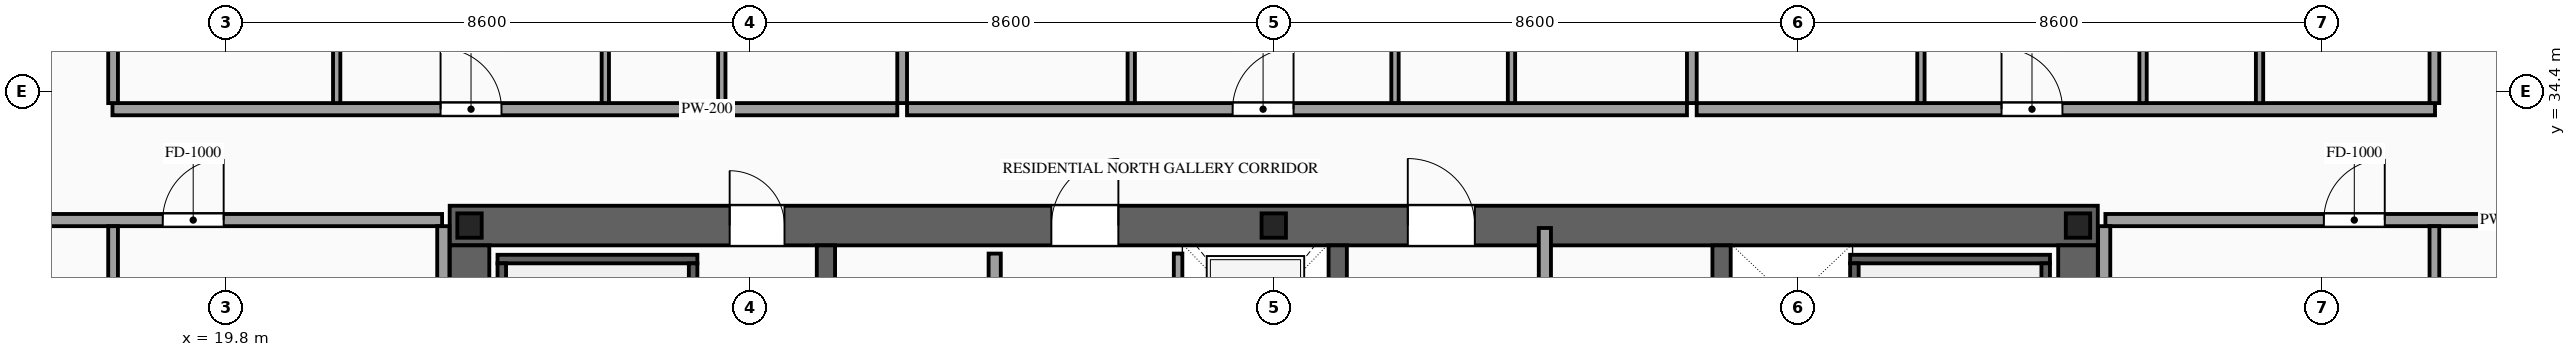
"""IFC4 building model, lengths in metres.
Left out: names, types, materials, properties, quantities, classifications, styles, units other than length and angle.
Written with IfcOpenShell. Run it as: python <this file> out.ifc"""

import sys

from ifc_helpers import new_model, si_unit, direction, frame, frame_2d, origin, origin_2d, place, context, subcontext, project, spatial, rectangle, i_section, extrude, source, transform, mapped, element, fill, save


model = new_model("IFC4")
c1 = context("Model", 3, precision=1e-05, world=origin(), true_north=direction((0.0, 1.0)))
c2 = subcontext(c1, "Body", "Model", "MODEL_VIEW")
j1 = project(units=[si_unit("LENGTHUNIT", "METRE"), si_unit("PLANEANGLEUNIT", "RADIAN")], contexts=[c1])
p1 = place(None, origin())
s1 = spatial("IfcSite", under=j1, at=p1, CompositionType="ELEMENT")
p2 = place(p1, origin())
s2 = spatial("IfcBuilding", under=s1, at=p2, CompositionType="ELEMENT")
p3 = place(p2, frame((0.0, 0.0, 205.5)))
s3 = spatial("IfcBuildingStorey", under=s2, at=p3, CompositionType="ELEMENT", Elevation=205.5)
p4 = place(p3, frame((23.475, 32.2, 0.0), z_axis=(0.0, 0.0, 1.0), x_axis=(1.0, 0.0, 0.0)))
e1 = element("IfcWall", 1, at=p4, inside=s3, PredefinedType="SHEAR", context=c2, shape_type="SweptSolid", body=[
    extrude(rectangle(XDim=27.05, YDim=0.65, at=frame_2d((13.525, 0.0))), origin(), (0.0, 0.0, 1.0), 3.5),
])
p5 = place(p4, frame((4.595, 0.0, 0.0)))
e2 = element("IfcOpeningElement", 2, at=p5, cuts=e1, PredefinedType="OPENING", context=c2, shape_type="SweptSolid", body=[
    extrude(rectangle(XDim=0.9, YDim=2.15, at=frame_2d((0.45, 1.075))), frame((0.0, 0.34, 0.0), z_axis=(0.0, -1.0, 0.0), x_axis=(1.0, 0.0, 0.0)), (0.0, 0.0, 1.0), 0.68),
])
p6 = place(p4, frame((9.875, 0.0, 0.0)))
e3 = element("IfcOpeningElement", 3, at=p6, cuts=e1, PredefinedType="OPENING", context=c2, shape_type="SweptSolid", body=[
    extrude(rectangle(XDim=1.1, YDim=2.2, at=frame_2d((0.55, 1.1))), frame((0.0, 0.34, 0.0), z_axis=(0.0, -1.0, 0.0), x_axis=(1.0, 0.0, 0.0)), (0.0, 0.0, 1.0), 0.68),
])
p7 = place(p4, frame((15.725, 0.0, 0.0)))
e4 = element("IfcOpeningElement", 4, at=p7, cuts=e1, PredefinedType="OPENING", context=c2, shape_type="SweptSolid", body=[
    extrude(rectangle(XDim=1.1, YDim=2.2, at=frame_2d((0.55, 1.1))), frame((0.0, 0.34, 0.0), z_axis=(0.0, -1.0, 0.0), x_axis=(1.0, 0.0, 0.0)), (0.0, 0.0, 1.0), 0.68),
])
m1 = source(origin(), c2, "Body", "SweptSolid", [
    extrude(rectangle(XDim=12.15, YDim=0.65, at=frame_2d((6.075, 0.0))), origin(), (0.0, 0.0, 1.0), 3.5),
])
for number, where, z_axis, x_axis in (
    (5, (23.8, 19.725, 0.0), (0.0, 0.0, 1.0), (0.0, 1.0, 0.0)),
    (6, (50.2, 19.725, 0.0), (0.0, 0.0, 1.0), (0.0, 1.0, 0.0)),
):
    element("IfcWall", number, at=place(p3, frame(where, z_axis=z_axis, x_axis=x_axis)), inside=s3, PredefinedType="SHEAR", context=c2, shape_type="MappedRepresentation", body=[
        mapped(m1, transform((0.0, 0.0, 0.0), scale=1.0)),
    ])
m2 = source(origin(), c2, "Body", "SweptSolid", [
    extrude(rectangle(XDim=12.15, YDim=0.3, at=frame_2d((6.075, 0.0))), origin(), (0.0, 0.0, 1.0), 3.5),
])
for number, where, z_axis, x_axis in (
    (7, (29.65, 19.725, 0.0), (0.0, 0.0, 1.0), (0.0, 1.0, 0.0)),
    (8, (38.05, 19.725, 0.0), (0.0, 0.0, 1.0), (0.0, 1.0, 0.0)),
    (9, (44.35, 19.725, 0.0), (0.0, 0.0, 1.0), (0.0, 1.0, 0.0)),
):
    element("IfcWall", number, at=place(p3, frame(where, z_axis=z_axis, x_axis=x_axis)), inside=s3, PredefinedType="SOLIDWALL", context=c2, shape_type="MappedRepresentation", body=[
        mapped(m2, transform((0.0, 0.0, 0.0), scale=1.0)),
    ])
m3 = source(origin(), c2, "Body", "SweptSolid", [
    extrude(i_section(OverallWidth=0.4, OverallDepth=0.4, WebThickness=0.013, FlangeThickness=0.021, at=origin_2d()), origin(), (0.0, 0.0, 1.0), 3.5),
])
for number, where, z_axis, x_axis in (
    (10, (23.8, 32.2, 0.0), (0.0, 0.0, 1.0), (1.0, 0.0, 0.0)),
    (11, (37.0, 32.2, 0.0), (0.0, 0.0, 1.0), (1.0, 0.0, 0.0)),
    (12, (50.2, 32.2, 0.0), (0.0, 0.0, 1.0), (1.0, 0.0, 0.0)),
):
    element("IfcColumn", number, at=place(p3, frame(where, z_axis=z_axis, x_axis=x_axis)), inside=s3, PredefinedType="COLUMN", context=c2, shape_type="MappedRepresentation", body=[
        mapped(m3, transform((0.0, 0.0, 0.0), scale=1.0)),
    ])
p8 = place(p3, frame((35.43, 29.4, 0.0), z_axis=(0.0, 0.0, 1.0), x_axis=(0.0, 1.0, 0.0)))
e13 = element("IfcWall", 13, at=p8, inside=s3, PredefinedType="SOLIDWALL", context=c2, shape_type="SweptSolid", body=[
    extrude(rectangle(XDim=2.34, YDim=0.14, at=frame_2d((1.17, 0.0))), origin(), (0.0, 0.0, 1.0), 3.28),
])
p9 = place(p8, frame((0.62, 0.0, 0.0)))
e14 = element("IfcOpeningElement", 14, at=p9, cuts=e13, PredefinedType="OPENING", context=c2, shape_type="SweptSolid", body=[
    extrude(rectangle(XDim=1.1, YDim=2.2, at=frame_2d((0.55, 1.1))), frame((0.0, 0.085, 0.0), z_axis=(0.0, -1.0, 0.0), x_axis=(1.0, 0.0, 0.0)), (0.0, 0.0, 1.0), 0.17),
])
m4 = source(origin(), c2, "Body", "SweptSolid", [
    extrude(rectangle(XDim=3.28, YDim=0.14, at=frame_2d((1.64, 0.0))), origin(), (0.0, 0.0, 1.0), 3.28),
])
p10 = place(p3, frame((24.26, 31.65, 0.0), z_axis=(0.0, 0.0, 1.0), x_axis=(1.0, 0.0, 0.0)))
e15 = element("IfcWall", 15, at=p10, inside=s3, PredefinedType="SOLIDWALL", context=c2, shape_type="MappedRepresentation", body=[
    mapped(m4, transform((0.0, 0.0, 0.0), scale=1.0)),
])
m5 = source(origin(), c2, "Body", "SweptSolid", [
    extrude(rectangle(XDim=8.94, YDim=0.14, at=frame_2d((4.47, 0.0))), origin(), (0.0, 0.0, 1.0), 3.28),
])
for number, where, z_axis, x_axis in (
    (16, (24.33, 22.64, 0.0), (0.0, 0.0, 1.0), (0.0, 1.0, 0.0)),
    (17, (27.47, 22.64, 0.0), (0.0, 0.0, 1.0), (0.0, 1.0, 0.0)),
):
    element("IfcWall", number, at=place(p3, frame(where, z_axis=z_axis, x_axis=x_axis)), inside=s3, PredefinedType="SOLIDWALL", context=c2, shape_type="MappedRepresentation", body=[
        mapped(m5, transform((0.0, 0.0, 0.0), scale=1.0)),
    ])
p11 = place(p3, frame((46.46, 31.65, 0.0), z_axis=(0.0, 0.0, 1.0), x_axis=(1.0, 0.0, 0.0)))
e18 = element("IfcWall", 18, at=p11, inside=s3, PredefinedType="SOLIDWALL", context=c2, shape_type="MappedRepresentation", body=[
    mapped(m4, transform((0.0, 0.0, 0.0), scale=1.0)),
])
for number, where, z_axis, x_axis in (
    (19, (46.53, 22.64, 0.0), (0.0, 0.0, 1.0), (0.0, 1.0, 0.0)),
    (20, (49.67, 22.64, 0.0), (0.0, 0.0, 1.0), (0.0, 1.0, 0.0)),
):
    element("IfcWall", number, at=place(p3, frame(where, z_axis=z_axis, x_axis=x_axis)), inside=s3, PredefinedType="SOLIDWALL", context=c2, shape_type="MappedRepresentation", body=[
        mapped(m5, transform((0.0, 0.0, 0.0), scale=1.0)),
    ])
p12 = place(p3, frame((32.42, 19.86, 0.0), z_axis=(0.0, 0.0, 1.0), x_axis=(0.0, 1.0, 0.0)))
e21 = element("IfcWall", 21, at=p12, inside=s3, PredefinedType="PARTITIONING", context=c2, shape_type="SweptSolid", body=[
    extrude(rectangle(XDim=11.88, YDim=0.2, at=frame_2d((5.94, 0.0))), origin(), (0.0, 0.0, 1.0), 3.28),
])
p13 = place(p12, frame((5.49, 0.0, 0.0)))
e22 = element("IfcOpeningElement", 22, at=p13, cuts=e21, PredefinedType="OPENING", context=c2, shape_type="SweptSolid", body=[
    extrude(rectangle(XDim=0.9, YDim=2.15, at=frame_2d((0.45, 1.075))), frame((0.0, 0.115, 0.0), z_axis=(0.0, -1.0, 0.0), x_axis=(1.0, 0.0, 0.0)), (0.0, 0.0, 1.0), 0.23),
])
m6 = source(origin(), c2, "Body", "SweptSolid", [
    extrude(rectangle(XDim=12.72, YDim=0.2, at=frame_2d((6.36, 0.0))), origin(), (0.0, 0.0, 1.0), 3.28),
])
p14 = place(p3, frame((41.45, 19.44, 0.0), z_axis=(0.0, 0.0, 1.0), x_axis=(0.0, 1.0, 0.0)))
e23 = element("IfcWall", 23, at=p14, inside=s3, PredefinedType="PARTITIONING", context=c2, shape_type="MappedRepresentation", body=[
    mapped(m6, transform((0.0, 0.0, 0.0), scale=1.0)),
])
p15 = place(p3, frame((17.94, 34.11, 0.0), z_axis=(0.0, 0.0, 1.0), x_axis=(1.0, 0.0, 0.0)))
e24 = element("IfcWall", 24, at=p15, inside=s3, PredefinedType="PARTITIONING", context=c2, shape_type="SweptSolid", body=[
    extrude(rectangle(XDim=12.881, YDim=0.2, at=frame_2d((6.44, 0.0))), origin(), (0.0, 0.0, 1.0), 3.28),
])
p16 = place(p15, frame((5.385, 0.0, 0.0)))
e25 = element("IfcOpeningElement", 25, at=p16, cuts=e24, PredefinedType="OPENING", context=c2, shape_type="SweptSolid", body=[
    extrude(rectangle(XDim=1.0, YDim=2.2, at=frame_2d((0.5, 1.1))), frame((0.0, 0.115, 0.0), z_axis=(0.0, -1.0, 0.0), x_axis=(1.0, 0.0, 0.0)), (0.0, 0.0, 1.0), 0.23),
])
m7 = source(origin(), c2, "Body", "SweptSolid", [
    extrude(rectangle(XDim=13.54, YDim=0.16, at=frame_2d((6.77, 0.0))), origin(), (0.0, 0.0, 1.0), 3.28),
])
p17 = place(p3, frame((30.901, 34.21, 0.0), z_axis=(0.0, 0.0, 1.0), x_axis=(0.0, 1.0, 0.0)))
e26 = element("IfcWall", 26, at=p17, inside=s3, PredefinedType="PARTITIONING", context=c2, shape_type="MappedRepresentation", body=[
    mapped(m7, transform((0.0, 0.0, 0.0), scale=1.0)),
])
m8 = source(origin(), c2, "Body", "SweptSolid", [
    extrude(rectangle(XDim=5.61, YDim=0.12, at=frame_2d((2.805, 0.0))), origin(), (0.0, 0.0, 1.0), 3.28),
])
p18 = place(p3, frame((21.62, 34.21, 0.0), z_axis=(0.0, 0.0, 1.0), x_axis=(0.0, 1.0, 0.0)))
e27 = element("IfcWall", 27, at=p18, inside=s3, PredefinedType="PARTITIONING", context=c2, shape_type="MappedRepresentation", body=[
    mapped(m8, transform((0.0, 0.0, 0.0), scale=1.0)),
])
p19 = place(p3, frame((27.941, 34.21, 0.0), z_axis=(0.0, 0.0, 1.0), x_axis=(0.0, 1.0, 0.0)))
e28 = element("IfcWall", 28, at=p19, inside=s3, PredefinedType="PARTITIONING", context=c2, shape_type="SweptSolid", body=[
    extrude(rectangle(XDim=5.61, YDim=0.12, at=frame_2d((2.805, 0.0))), origin(), (0.0, 0.0, 1.0), 3.28),
])
p20 = place(p19, frame((2.38, 0.0, 0.0)))
e29 = element("IfcOpeningElement", 29, at=p20, cuts=e28, PredefinedType="OPENING", context=c2, shape_type="SweptSolid", body=[
    extrude(rectangle(XDim=0.85, YDim=2.1, at=frame_2d((0.425, 1.05))), frame((0.0, 0.075, 0.0), z_axis=(0.0, -1.0, 0.0), x_axis=(1.0, 0.0, 0.0)), (0.0, 0.0, 1.0), 0.15),
])
p21 = place(p3, frame((26.029, 34.21, 0.0), z_axis=(0.0, 0.0, 1.0), x_axis=(0.0, 1.0, 0.0)))
e30 = element("IfcWall", 30, at=p21, inside=s3, PredefinedType="PARTITIONING", context=c2, shape_type="SweptSolid", body=[
    extrude(rectangle(XDim=5.61, YDim=0.12, at=frame_2d((2.805, 0.0))), origin(), (0.0, 0.0, 1.0), 3.28),
])
p22 = place(p21, frame((2.38, 0.0, 0.0)))
e31 = element("IfcOpeningElement", 31, at=p22, cuts=e30, PredefinedType="OPENING", context=c2, shape_type="SweptSolid", body=[
    extrude(rectangle(XDim=0.85, YDim=2.1, at=frame_2d((0.425, 1.05))), frame((0.0, 0.075, 0.0), z_axis=(0.0, -1.0, 0.0), x_axis=(1.0, 0.0, 0.0)), (0.0, 0.0, 1.0), 0.15),
])
p23 = place(p3, frame((30.981, 34.11, 0.0), z_axis=(0.0, 0.0, 1.0), x_axis=(1.0, 0.0, 0.0)))
e32 = element("IfcWall", 32, at=p23, inside=s3, PredefinedType="PARTITIONING", context=c2, shape_type="SweptSolid", body=[
    extrude(rectangle(XDim=12.801, YDim=0.2, at=frame_2d((6.4, 0.0))), origin(), (0.0, 0.0, 1.0), 3.28),
])
p24 = place(p23, frame((5.344, 0.0, 0.0)))
e33 = element("IfcOpeningElement", 33, at=p24, cuts=e32, PredefinedType="OPENING", context=c2, shape_type="SweptSolid", body=[
    extrude(rectangle(XDim=1.0, YDim=2.2, at=frame_2d((0.5, 1.1))), frame((0.0, 0.115, 0.0), z_axis=(0.0, -1.0, 0.0), x_axis=(1.0, 0.0, 0.0)), (0.0, 0.0, 1.0), 0.23),
])
p25 = place(p3, frame((43.862, 34.21, 0.0), z_axis=(0.0, 0.0, 1.0), x_axis=(0.0, 1.0, 0.0)))
e34 = element("IfcWall", 34, at=p25, inside=s3, PredefinedType="PARTITIONING", context=c2, shape_type="MappedRepresentation", body=[
    mapped(m7, transform((0.0, 0.0, 0.0), scale=1.0)),
])
p26 = place(p3, frame((34.661, 34.21, 0.0), z_axis=(0.0, 0.0, 1.0), x_axis=(0.0, 1.0, 0.0)))
e35 = element("IfcWall", 35, at=p26, inside=s3, PredefinedType="PARTITIONING", context=c2, shape_type="MappedRepresentation", body=[
    mapped(m8, transform((0.0, 0.0, 0.0), scale=1.0)),
])
p27 = place(p3, frame((40.902, 34.21, 0.0), z_axis=(0.0, 0.0, 1.0), x_axis=(0.0, 1.0, 0.0)))
e36 = element("IfcWall", 36, at=p27, inside=s3, PredefinedType="PARTITIONING", context=c2, shape_type="SweptSolid", body=[
    extrude(rectangle(XDim=5.61, YDim=0.12, at=frame_2d((2.805, 0.0))), origin(), (0.0, 0.0, 1.0), 3.28),
])
p28 = place(p27, frame((2.38, 0.0, 0.0)))
e37 = element("IfcOpeningElement", 37, at=p28, cuts=e36, PredefinedType="OPENING", context=c2, shape_type="SweptSolid", body=[
    extrude(rectangle(XDim=0.85, YDim=2.1, at=frame_2d((0.425, 1.05))), frame((0.0, 0.075, 0.0), z_axis=(0.0, -1.0, 0.0), x_axis=(1.0, 0.0, 0.0)), (0.0, 0.0, 1.0), 0.15),
])
p29 = place(p3, frame((38.99, 34.21, 0.0), z_axis=(0.0, 0.0, 1.0), x_axis=(0.0, 1.0, 0.0)))
e38 = element("IfcWall", 38, at=p29, inside=s3, PredefinedType="PARTITIONING", context=c2, shape_type="SweptSolid", body=[
    extrude(rectangle(XDim=5.61, YDim=0.12, at=frame_2d((2.805, 0.0))), origin(), (0.0, 0.0, 1.0), 3.28),
])
p30 = place(p29, frame((2.38, 0.0, 0.0)))
e39 = element("IfcOpeningElement", 39, at=p30, cuts=e38, PredefinedType="OPENING", context=c2, shape_type="SweptSolid", body=[
    extrude(rectangle(XDim=0.85, YDim=2.1, at=frame_2d((0.425, 1.05))), frame((0.0, 0.075, 0.0), z_axis=(0.0, -1.0, 0.0), x_axis=(1.0, 0.0, 0.0)), (0.0, 0.0, 1.0), 0.15),
])
p31 = place(p3, frame((43.942, 34.11, 0.0), z_axis=(0.0, 0.0, 1.0), x_axis=(1.0, 0.0, 0.0)))
e40 = element("IfcWall", 40, at=p31, inside=s3, PredefinedType="PARTITIONING", context=c2, shape_type="SweptSolid", body=[
    extrude(rectangle(XDim=12.118, YDim=0.2, at=frame_2d((6.059, 0.0))), origin(), (0.0, 0.0, 1.0), 3.28),
])
p32 = place(p31, frame((5.003, 0.0, 0.0)))
e41 = element("IfcOpeningElement", 41, at=p32, cuts=e40, PredefinedType="OPENING", context=c2, shape_type="SweptSolid", body=[
    extrude(rectangle(XDim=1.0, YDim=2.2, at=frame_2d((0.5, 1.1))), frame((0.0, 0.115, 0.0), z_axis=(0.0, -1.0, 0.0), x_axis=(1.0, 0.0, 0.0)), (0.0, 0.0, 1.0), 0.23),
])
m9 = source(origin(), c2, "Body", "SweptSolid", [
    extrude(rectangle(XDim=13.39, YDim=0.16, at=frame_2d((6.695, 0.0))), origin(), (0.0, 0.0, 1.0), 3.28),
])
for number, where, z_axis, x_axis in (
    (42, (17.95, 34.21, 0.0), (0.0, 0.0, 1.0), (0.0, 1.0, 0.0)),
    (43, (56.05, 34.21, 0.0), (0.0, 0.0, 1.0), (0.0, 1.0, 0.0)),
):
    element("IfcWall", number, at=place(p3, frame(where, z_axis=z_axis, x_axis=x_axis)), inside=s3, PredefinedType="PARTITIONING", context=c2, shape_type="MappedRepresentation", body=[
        mapped(m9, transform((0.0, 0.0, 0.0), scale=1.0)),
    ])
p33 = place(p3, frame((47.622, 34.21, 0.0), z_axis=(0.0, 0.0, 1.0), x_axis=(0.0, 1.0, 0.0)))
e44 = element("IfcWall", 44, at=p33, inside=s3, PredefinedType="PARTITIONING", context=c2, shape_type="MappedRepresentation", body=[
    mapped(m8, transform((0.0, 0.0, 0.0), scale=1.0)),
])
p34 = place(p3, frame((53.18, 34.21, 0.0), z_axis=(0.0, 0.0, 1.0), x_axis=(0.0, 1.0, 0.0)))
e45 = element("IfcWall", 45, at=p34, inside=s3, PredefinedType="PARTITIONING", context=c2, shape_type="SweptSolid", body=[
    extrude(rectangle(XDim=5.61, YDim=0.12, at=frame_2d((2.805, 0.0))), origin(), (0.0, 0.0, 1.0), 3.28),
])
p35 = place(p34, frame((2.38, 0.0, 0.0)))
e46 = element("IfcOpeningElement", 46, at=p35, cuts=e45, PredefinedType="OPENING", context=c2, shape_type="SweptSolid", body=[
    extrude(rectangle(XDim=0.85, YDim=2.1, at=frame_2d((0.425, 1.05))), frame((0.0, 0.075, 0.0), z_axis=(0.0, -1.0, 0.0), x_axis=(1.0, 0.0, 0.0)), (0.0, 0.0, 1.0), 0.15),
])
p36 = place(p3, frame((51.268, 34.21, 0.0), z_axis=(0.0, 0.0, 1.0), x_axis=(0.0, 1.0, 0.0)))
e47 = element("IfcWall", 47, at=p36, inside=s3, PredefinedType="PARTITIONING", context=c2, shape_type="SweptSolid", body=[
    extrude(rectangle(XDim=5.61, YDim=0.12, at=frame_2d((2.805, 0.0))), origin(), (0.0, 0.0, 1.0), 3.28),
])
p37 = place(p36, frame((2.38, 0.0, 0.0)))
e48 = element("IfcOpeningElement", 48, at=p37, cuts=e47, PredefinedType="OPENING", context=c2, shape_type="SweptSolid", body=[
    extrude(rectangle(XDim=0.85, YDim=2.1, at=frame_2d((0.425, 1.05))), frame((0.0, 0.075, 0.0), z_axis=(0.0, -1.0, 0.0), x_axis=(1.0, 0.0, 0.0)), (0.0, 0.0, 1.0), 0.15),
])
p38 = place(p3, frame((15.05, 32.29, 0.0), z_axis=(0.0, 0.0, 1.0), x_axis=(1.0, 0.0, 0.0)))
e49 = element("IfcWall", 49, at=p38, inside=s3, PredefinedType="PARTITIONING", context=c2, shape_type="SweptSolid", body=[
    extrude(rectangle(XDim=8.3, YDim=0.2, at=frame_2d((4.15, 0.0))), origin(), (0.0, 0.0, 1.0), 2.775),
])
p39 = place(p38, frame((3.715, 0.0, 0.0)))
e50 = element("IfcOpeningElement", 50, at=p39, cuts=e49, PredefinedType="OPENING", context=c2, shape_type="SweptSolid", body=[
    extrude(rectangle(XDim=1.0, YDim=2.2, at=frame_2d((0.5, 1.1))), frame((0.0, 0.115, 0.0), z_axis=(0.0, -1.0, 0.0), x_axis=(1.0, 0.0, 0.0)), (0.0, 0.0, 1.0), 0.23),
])
m10 = source(origin(), c2, "Body", "SweptSolid", [
    extrude(rectangle(XDim=12.78, YDim=0.2, at=frame_2d((6.39, 0.0))), origin(), (0.0, 0.0, 1.0), 3.28),
])
p40 = place(p3, frame((23.37, 19.41, 0.0), z_axis=(0.0, 0.0, 1.0), x_axis=(0.0, 1.0, 0.0)))
e51 = element("IfcWall", 51, at=p40, inside=s3, PredefinedType="PARTITIONING", context=c2, shape_type="MappedRepresentation", body=[
    mapped(m10, transform((0.0, 0.0, 0.0), scale=1.0)),
])
p41 = place(p3, frame((50.65, 32.29, 0.0), z_axis=(0.0, 0.0, 1.0), x_axis=(1.0, 0.0, 0.0)))
e52 = element("IfcWall", 52, at=p41, inside=s3, PredefinedType="PARTITIONING", context=c2, shape_type="SweptSolid", body=[
    extrude(rectangle(XDim=8.3, YDim=0.2, at=frame_2d((4.15, 0.0))), origin(), (0.0, 0.0, 1.0), 2.775),
])
p42 = place(p41, frame((3.585, 0.0, 0.0)))
e53 = element("IfcOpeningElement", 53, at=p42, cuts=e52, PredefinedType="OPENING", context=c2, shape_type="SweptSolid", body=[
    extrude(rectangle(XDim=1.0, YDim=2.2, at=frame_2d((0.5, 1.1))), frame((0.0, 0.115, 0.0), z_axis=(0.0, -1.0, 0.0), x_axis=(1.0, 0.0, 0.0)), (0.0, 0.0, 1.0), 0.23),
])
m11 = source(origin(), c2, "Body", "SweptSolid", [
    extrude(rectangle(XDim=28.19, YDim=0.16, at=frame_2d((14.095, 0.0))), origin(), (0.0, 0.0, 1.0), 3.28),
])
for number, where, z_axis, x_axis in (
    (54, (17.95, 4.0, 0.0), (0.0, 0.0, 1.0), (0.0, 1.0, 0.0)),
    (55, (56.05, 4.0, 0.0), (0.0, 0.0, 1.0), (0.0, 1.0, 0.0)),
):
    element("IfcWall", number, at=place(p3, frame(where, z_axis=z_axis, x_axis=x_axis)), inside=s3, PredefinedType="PARTITIONING", context=c2, shape_type="MappedRepresentation", body=[
        mapped(m11, transform((0.0, 0.0, 0.0), scale=1.0)),
    ])
m12 = source(origin(), c2, "Body", "SweptSolid", [
    extrude(rectangle(XDim=6.29, YDim=0.2, at=frame_2d((3.145, 0.0))), origin(), (0.0, 0.0, 1.0), 3.28),
])
p43 = place(p3, frame((50.63, 25.9, 0.0), z_axis=(0.0, 0.0, 1.0), x_axis=(0.0, 1.0, 0.0)))
e56 = element("IfcWall", 56, at=p43, inside=s3, PredefinedType="PARTITIONING", context=c2, shape_type="MappedRepresentation", body=[
    mapped(m12, transform((0.0, 0.0, 0.0), scale=1.0)),
])
m13 = source(origin(), c2, "Body", "SweptSolid", [
    extrude(rectangle(XDim=0.9, YDim=2.15, at=frame_2d((0.45, 1.075))), frame((0.0, 0.025, 0.0), z_axis=(0.0, -1.0, 0.0), x_axis=(1.0, 0.0, 0.0)), (0.0, 0.0, 1.0), 0.05),
])
p44 = place(p5, origin())
e57 = element("IfcDoor", 57, at=p44, inside=s3, OperationType="SINGLE_SWING_LEFT", PredefinedType="DOOR", context=c2, shape_type="MappedRepresentation", body=[
    mapped(m13, transform((0.0, 0.0, 0.0), scale=1.0)),
])
fill(e2, e57)
m14 = source(origin(), c2, "Body", "SweptSolid", [
    extrude(rectangle(XDim=1.1, YDim=2.2, at=frame_2d((0.55, 1.1))), frame((0.0, 0.025, 0.0), z_axis=(0.0, -1.0, 0.0), x_axis=(1.0, 0.0, 0.0)), (0.0, 0.0, 1.0), 0.05),
])
p45 = place(p6, origin())
e58 = element("IfcDoor", 58, at=p45, inside=s3, OperationType="SINGLE_SWING_RIGHT", PredefinedType="DOOR", context=c2, shape_type="MappedRepresentation", body=[
    mapped(m14, transform((0.0, 0.0, 0.0), scale=1.0)),
])
fill(e3, e58)
p46 = place(p7, origin())
e59 = element("IfcDoor", 59, at=p46, inside=s3, OperationType="SINGLE_SWING_LEFT", PredefinedType="DOOR", context=c2, shape_type="MappedRepresentation", body=[
    mapped(m14, transform((0.0, 0.0, 0.0), scale=1.0)),
])
fill(e4, e59)
m15 = source(origin(), c2, "Body", "SweptSolid", [
    extrude(rectangle(XDim=1.0, YDim=2.2, at=frame_2d((0.5, 1.1))), frame((0.0, 0.025, 0.0), z_axis=(0.0, -1.0, 0.0), x_axis=(1.0, 0.0, 0.0)), (0.0, 0.0, 1.0), 0.05),
])
p47 = place(p16, origin())
e60 = element("IfcDoor", 60, at=p47, inside=s3, OperationType="SINGLE_SWING_LEFT", PredefinedType="DOOR", context=c2, shape_type="MappedRepresentation", body=[
    mapped(m15, transform((0.0, 0.0, 0.0), scale=1.0)),
])
fill(e25, e60)
p48 = place(p24, origin())
e61 = element("IfcDoor", 61, at=p48, inside=s3, OperationType="SINGLE_SWING_RIGHT", PredefinedType="DOOR", context=c2, shape_type="MappedRepresentation", body=[
    mapped(m15, transform((0.0, 0.0, 0.0), scale=1.0)),
])
fill(e33, e61)
p49 = place(p32, origin())
e62 = element("IfcDoor", 62, at=p49, inside=s3, OperationType="SINGLE_SWING_LEFT", PredefinedType="DOOR", context=c2, shape_type="MappedRepresentation", body=[
    mapped(m15, transform((0.0, 0.0, 0.0), scale=1.0)),
])
fill(e41, e62)
p50 = place(p39, origin())
e63 = element("IfcDoor", 63, at=p50, inside=s3, OperationType="SINGLE_SWING_RIGHT", PredefinedType="DOOR", context=c2, shape_type="MappedRepresentation", body=[
    mapped(m15, transform((0.0, 0.0, 0.0), scale=1.0)),
])
fill(e50, e63)
p51 = place(p42, origin())
e64 = element("IfcDoor", 64, at=p51, inside=s3, OperationType="SINGLE_SWING_RIGHT", PredefinedType="DOOR", context=c2, shape_type="MappedRepresentation", body=[
    mapped(m15, transform((0.0, 0.0, 0.0), scale=1.0)),
])
fill(e53, e64)
save(model, sys.argv[1])
